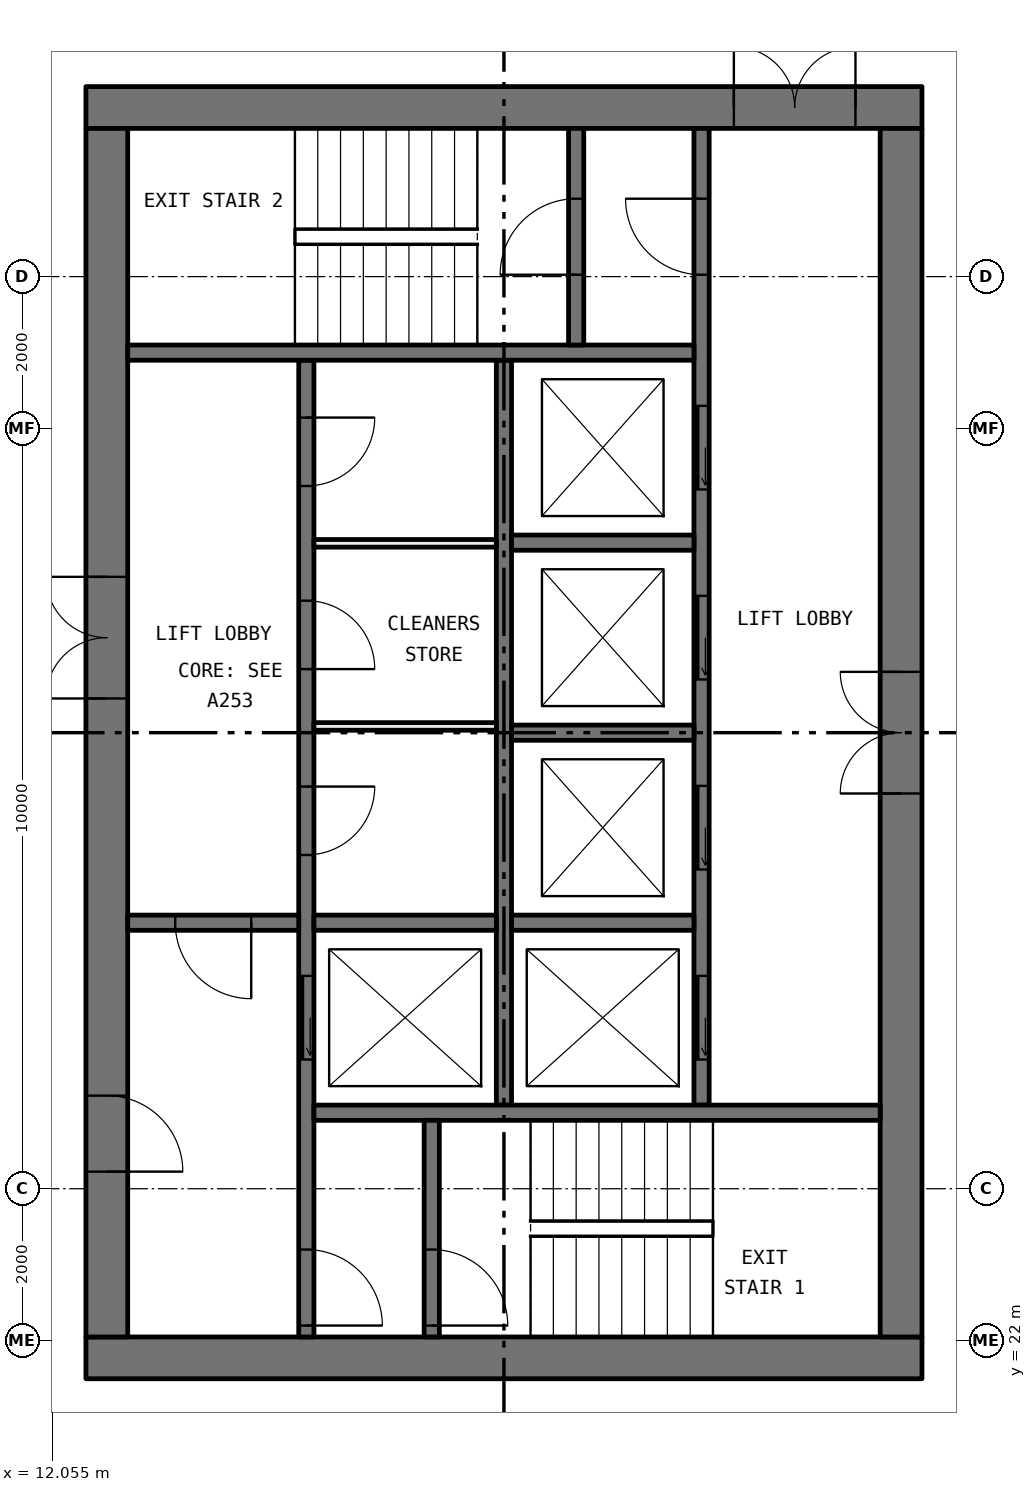
"""IFC4 building model, lengths in metres.
Left out: names, types, materials, properties, quantities, classifications, styles, units other than length and angle.
Written with IfcOpenShell. Run it as: python <this file> out.ifc"""

import sys

from ifc_helpers import new_model, si_unit, direction, frame, frame_2d, origin, place, context, subcontext, project, spatial, rectangle, extrude, element, fill, save


model = new_model("IFC4")
c1 = context("Model", 3, precision=1e-05, world=origin(), true_north=direction((0.0, 1.0)))
c2 = subcontext(c1, "Body", "Model", "MODEL_VIEW")
j1 = project(units=[si_unit("LENGTHUNIT", "METRE"), si_unit("PLANEANGLEUNIT", "RADIAN")], contexts=[c1])
p1 = place(None, origin())
s1 = spatial("IfcSite", under=j1, at=p1, CompositionType="ELEMENT")
p2 = place(p1, origin())
s2 = spatial("IfcBuilding", under=s1, at=p2, CompositionType="ELEMENT")
p3 = place(p2, frame((0.0, 0.0, 196.2)))
s3 = spatial("IfcBuildingStorey", under=s2, at=p3, CompositionType="ELEMENT", Elevation=196.2)
p4 = place(p3, frame((12.5, 21.775, 0.0), z_axis=(0.0, 0.0, 1.0), x_axis=(1.0, 0.0, 0.0)))
e1 = element("IfcWall", 1, at=p4, inside=s3, PredefinedType="SHEAR", context=c2, shape_type="SweptSolid", body=[
    extrude(rectangle(XDim=11.0, YDim=0.55, at=frame_2d((5.5, 0.0))), origin(), (0.0, 0.0, 1.0), 3.05),
])
p5 = place(p3, frame((12.5, 38.225, 0.0), z_axis=(0.0, 0.0, 1.0), x_axis=(1.0, 0.0, 0.0)))
e2 = element("IfcWall", 2, at=p5, inside=s3, PredefinedType="SHEAR", context=c2, shape_type="SweptSolid", body=[
    extrude(rectangle(XDim=11.0, YDim=0.55, at=frame_2d((5.5, 0.0))), origin(), (0.0, 0.0, 1.0), 3.05),
])
p6 = place(p5, frame((8.525, 0.0, 0.0)))
e3 = element("IfcOpeningElement", 3, at=p6, cuts=e2, PredefinedType="OPENING", context=c2, shape_type="SweptSolid", body=[
    extrude(rectangle(XDim=1.6, YDim=2.1, at=frame_2d((0.8, 1.05))), frame((0.0, 0.285, 0.0), z_axis=(0.0, -1.0, 0.0), x_axis=(1.0, 0.0, 0.0)), (0.0, 0.0, 1.0), 0.57),
])
p7 = place(p3, frame((12.775, 22.05, 0.0), z_axis=(0.0, 0.0, 1.0), x_axis=(0.0, 1.0, 0.0)))
e4 = element("IfcWall", 4, at=p7, inside=s3, PredefinedType="SHEAR", context=c2, shape_type="SweptSolid", body=[
    extrude(rectangle(XDim=15.9, YDim=0.55, at=frame_2d((7.95, 0.0))), origin(), (0.0, 0.0, 1.0), 3.05),
])
p8 = place(p7, frame((8.4, 0.0, 0.0)))
e5 = element("IfcOpeningElement", 5, at=p8, cuts=e4, PredefinedType="OPENING", context=c2, shape_type="SweptSolid", body=[
    extrude(rectangle(XDim=1.6, YDim=2.1, at=frame_2d((0.8, 1.05))), frame((0.0, 0.285, 0.0), z_axis=(0.0, -1.0, 0.0), x_axis=(1.0, 0.0, 0.0)), (0.0, 0.0, 1.0), 0.57),
])
p9 = place(p7, frame((2.175, 0.0, 0.0)))
e6 = element("IfcOpeningElement", 6, at=p9, cuts=e4, PredefinedType="OPENING", context=c2, shape_type="SweptSolid", body=[
    extrude(rectangle(XDim=1.0, YDim=2.1, at=frame_2d((0.5, 1.05))), frame((0.0, 0.285, 0.0), z_axis=(0.0, -1.0, 0.0), x_axis=(1.0, 0.0, 0.0)), (0.0, 0.0, 1.0), 0.57),
])
p10 = place(p3, frame((23.225, 22.05, 0.0), z_axis=(0.0, 0.0, 1.0), x_axis=(0.0, 1.0, 0.0)))
e7 = element("IfcWall", 7, at=p10, inside=s3, PredefinedType="SHEAR", context=c2, shape_type="SweptSolid", body=[
    extrude(rectangle(XDim=15.9, YDim=0.55, at=frame_2d((7.95, 0.0))), origin(), (0.0, 0.0, 1.0), 3.05),
])
p11 = place(p10, frame((7.15, 0.0, 0.0)))
e8 = element("IfcOpeningElement", 8, at=p11, cuts=e7, PredefinedType="OPENING", context=c2, shape_type="SweptSolid", body=[
    extrude(rectangle(XDim=1.6, YDim=2.1, at=frame_2d((0.8, 1.05))), frame((0.0, 0.285, 0.0), z_axis=(0.0, -1.0, 0.0), x_axis=(1.0, 0.0, 0.0)), (0.0, 0.0, 1.0), 0.57),
])
p12 = place(p3, frame((15.4, 22.05, 0.0), z_axis=(0.0, 0.0, 1.0), x_axis=(0.0, 1.0, 0.0)))
e9 = element("IfcWall", 9, at=p12, inside=s3, PredefinedType="SOLIDWALL", context=c2, shape_type="SweptSolid", body=[
    extrude(rectangle(XDim=12.85, YDim=0.2, at=frame_2d((6.425, 0.0))), origin(), (0.0, 0.0, 1.0), 3.05),
])
p13 = place(p12, frame((3.65, 0.0, 0.0)))
e10 = element("IfcOpeningElement", 10, at=p13, cuts=e9, PredefinedType="OPENING", context=c2, shape_type="SweptSolid", body=[
    extrude(rectangle(XDim=1.1, YDim=2.1, at=frame_2d((0.55, 1.05))), frame((0.0, 0.11, 0.0), z_axis=(0.0, -1.0, 0.0), x_axis=(1.0, 0.0, 0.0)), (0.0, 0.0, 1.0), 0.22),
])
p14 = place(p12, frame((0.15, 0.0, 0.0)))
e11 = element("IfcOpeningElement", 11, at=p14, cuts=e9, PredefinedType="OPENING", context=c2, shape_type="SweptSolid", body=[
    extrude(rectangle(XDim=1.0, YDim=2.1, at=frame_2d((0.5, 1.05))), frame((0.0, 0.11, 0.0), z_axis=(0.0, -1.0, 0.0), x_axis=(1.0, 0.0, 0.0)), (0.0, 0.0, 1.0), 0.22),
])
p15 = place(p12, frame((6.341, 0.0, 0.0)))
e12 = element("IfcOpeningElement", 12, at=p15, cuts=e9, PredefinedType="OPENING", context=c2, shape_type="SweptSolid", body=[
    extrude(rectangle(XDim=0.9, YDim=2.1, at=frame_2d((0.45, 1.05))), frame((0.0, 0.11, 0.0), z_axis=(0.0, -1.0, 0.0), x_axis=(1.0, 0.0, 0.0)), (0.0, 0.0, 1.0), 0.22),
])
p16 = place(p12, frame((8.787, 0.0, 0.0)))
e13 = element("IfcOpeningElement", 13, at=p16, cuts=e9, PredefinedType="OPENING", context=c2, shape_type="SweptSolid", body=[
    extrude(rectangle(XDim=0.9, YDim=2.1, at=frame_2d((0.45, 1.05))), frame((0.0, 0.11, 0.0), z_axis=(0.0, -1.0, 0.0), x_axis=(1.0, 0.0, 0.0)), (0.0, 0.0, 1.0), 0.22),
])
p17 = place(p12, frame((11.196, 0.0, 0.0)))
e14 = element("IfcOpeningElement", 14, at=p17, cuts=e9, PredefinedType="OPENING", context=c2, shape_type="SweptSolid", body=[
    extrude(rectangle(XDim=0.9, YDim=2.1, at=frame_2d((0.45, 1.05))), frame((0.0, 0.11, 0.0), z_axis=(0.0, -1.0, 0.0), x_axis=(1.0, 0.0, 0.0)), (0.0, 0.0, 1.0), 0.22),
])
p18 = place(p3, frame((20.6, 25.1, 0.0), z_axis=(0.0, 0.0, 1.0), x_axis=(0.0, 1.0, 0.0)))
e15 = element("IfcWall", 15, at=p18, inside=s3, PredefinedType="SOLIDWALL", context=c2, shape_type="SweptSolid", body=[
    extrude(rectangle(XDim=12.85, YDim=0.2, at=frame_2d((6.425, 0.0))), origin(), (0.0, 0.0, 1.0), 3.05),
])
p19 = place(p18, frame((0.6, 0.0, 0.0)))
e16 = element("IfcOpeningElement", 16, at=p19, cuts=e15, PredefinedType="OPENING", context=c2, shape_type="SweptSolid", body=[
    extrude(rectangle(XDim=1.1, YDim=2.1, at=frame_2d((0.55, 1.05))), frame((0.0, 0.11, 0.0), z_axis=(0.0, -1.0, 0.0), x_axis=(1.0, 0.0, 0.0)), (0.0, 0.0, 1.0), 0.22),
])
p20 = place(p18, frame((3.1, 0.0, 0.0)))
e17 = element("IfcOpeningElement", 17, at=p20, cuts=e15, PredefinedType="OPENING", context=c2, shape_type="SweptSolid", body=[
    extrude(rectangle(XDim=1.1, YDim=2.1, at=frame_2d((0.55, 1.05))), frame((0.0, 0.11, 0.0), z_axis=(0.0, -1.0, 0.0), x_axis=(1.0, 0.0, 0.0)), (0.0, 0.0, 1.0), 0.22),
])
p21 = place(p18, frame((5.6, 0.0, 0.0)))
e18 = element("IfcOpeningElement", 18, at=p21, cuts=e15, PredefinedType="OPENING", context=c2, shape_type="SweptSolid", body=[
    extrude(rectangle(XDim=1.1, YDim=2.1, at=frame_2d((0.55, 1.05))), frame((0.0, 0.11, 0.0), z_axis=(0.0, -1.0, 0.0), x_axis=(1.0, 0.0, 0.0)), (0.0, 0.0, 1.0), 0.22),
])
p22 = place(p18, frame((8.1, 0.0, 0.0)))
e19 = element("IfcOpeningElement", 19, at=p22, cuts=e15, PredefinedType="OPENING", context=c2, shape_type="SweptSolid", body=[
    extrude(rectangle(XDim=1.1, YDim=2.1, at=frame_2d((0.55, 1.05))), frame((0.0, 0.11, 0.0), z_axis=(0.0, -1.0, 0.0), x_axis=(1.0, 0.0, 0.0)), (0.0, 0.0, 1.0), 0.22),
])
p23 = place(p18, frame((10.925, 0.0, 0.0)))
e20 = element("IfcOpeningElement", 20, at=p23, cuts=e15, PredefinedType="OPENING", context=c2, shape_type="SweptSolid", body=[
    extrude(rectangle(XDim=1.0, YDim=2.1, at=frame_2d((0.5, 1.05))), frame((0.0, 0.11, 0.0), z_axis=(0.0, -1.0, 0.0), x_axis=(1.0, 0.0, 0.0)), (0.0, 0.0, 1.0), 0.22),
])
p24 = place(p3, frame((18.0, 25.1, 0.0), z_axis=(0.0, 0.0, 1.0), x_axis=(0.0, 1.0, 0.0)))
e21 = element("IfcWall", 21, at=p24, inside=s3, PredefinedType="SOLIDWALL", context=c2, shape_type="SweptSolid", body=[
    extrude(rectangle(XDim=9.8, YDim=0.2, at=frame_2d((4.9, 0.0))), origin(), (0.0, 0.0, 1.0), 3.05),
])
for number, where, z_axis, x_axis in (
    (22, (15.5, 25.0, 0.0), (0.0, 0.0, 1.0), (1.0, 0.0, 0.0)),
    (23, (13.05, 35.0, 0.0), (0.0, 0.0, 1.0), (1.0, 0.0, 0.0)),
):
    element("IfcWall", number, at=place(p3, frame(where, z_axis=z_axis, x_axis=x_axis)), inside=s3, PredefinedType="SOLIDWALL", context=c2, shape_type="SweptSolid", body=[
        extrude(rectangle(XDim=7.45, YDim=0.2, at=frame_2d((3.725, 0.0))), origin(), (0.0, 0.0, 1.0), 3.05),
    ])
p25 = place(p3, frame((13.05, 27.5, 0.0), z_axis=(0.0, 0.0, 1.0), x_axis=(1.0, 0.0, 0.0)))
e24 = element("IfcWall", 24, at=p25, inside=s3, PredefinedType="SOLIDWALL", context=c2, shape_type="SweptSolid", body=[
    extrude(rectangle(XDim=2.25, YDim=0.2, at=frame_2d((1.125, 0.0))), origin(), (0.0, 0.0, 1.0), 3.05),
])
p26 = place(p25, frame((0.625, 0.0, 0.0)))
e25 = element("IfcOpeningElement", 25, at=p26, cuts=e24, PredefinedType="OPENING", context=c2, shape_type="SweptSolid", body=[
    extrude(rectangle(XDim=1.0, YDim=2.1, at=frame_2d((0.5, 1.05))), frame((0.0, 0.11, 0.0), z_axis=(0.0, -1.0, 0.0), x_axis=(1.0, 0.0, 0.0)), (0.0, 0.0, 1.0), 0.22),
])
p27 = place(p3, frame((17.05, 22.05, 0.0), z_axis=(0.0, 0.0, 1.0), x_axis=(0.0, 1.0, 0.0)))
e26 = element("IfcWall", 26, at=p27, inside=s3, PredefinedType="SOLIDWALL", context=c2, shape_type="SweptSolid", body=[
    extrude(rectangle(XDim=2.85, YDim=0.2, at=frame_2d((1.425, 0.0))), origin(), (0.0, 0.0, 1.0), 3.05),
])
p28 = place(p27, frame((0.15, 0.0, 0.0)))
e27 = element("IfcOpeningElement", 27, at=p28, cuts=e26, PredefinedType="OPENING", context=c2, shape_type="SweptSolid", body=[
    extrude(rectangle(XDim=1.0, YDim=2.1, at=frame_2d((0.5, 1.05))), frame((0.0, 0.11, 0.0), z_axis=(0.0, -1.0, 0.0), x_axis=(1.0, 0.0, 0.0)), (0.0, 0.0, 1.0), 0.22),
])
p29 = place(p3, frame((18.95, 35.1, 0.0), z_axis=(0.0, 0.0, 1.0), x_axis=(0.0, 1.0, 0.0)))
e28 = element("IfcWall", 28, at=p29, inside=s3, PredefinedType="SOLIDWALL", context=c2, shape_type="SweptSolid", body=[
    extrude(rectangle(XDim=2.85, YDim=0.2, at=frame_2d((1.425, 0.0))), origin(), (0.0, 0.0, 1.0), 3.05),
])
p30 = place(p29, frame((0.925, 0.0, 0.0)))
e29 = element("IfcOpeningElement", 29, at=p30, cuts=e28, PredefinedType="OPENING", context=c2, shape_type="SweptSolid", body=[
    extrude(rectangle(XDim=1.0, YDim=2.1, at=frame_2d((0.5, 1.05))), frame((0.0, 0.11, 0.0), z_axis=(0.0, -1.0, 0.0), x_axis=(1.0, 0.0, 0.0)), (0.0, 0.0, 1.0), 0.22),
])
for number, where, z_axis, x_axis in (
    (30, (15.5, 27.5, 0.0), (0.0, 0.0, 1.0), (1.0, 0.0, 0.0)),
    (31, (18.1, 27.5, 0.0), (0.0, 0.0, 1.0), (1.0, 0.0, 0.0)),
    (32, (18.1, 30.0, 0.0), (0.0, 0.0, 1.0), (1.0, 0.0, 0.0)),
    (33, (18.1, 32.5, 0.0), (0.0, 0.0, 1.0), (1.0, 0.0, 0.0)),
):
    element("IfcWall", number, at=place(p3, frame(where, z_axis=z_axis, x_axis=x_axis)), inside=s3, PredefinedType="SOLIDWALL", context=c2, shape_type="SweptSolid", body=[
        extrude(rectangle(XDim=2.4, YDim=0.2, at=frame_2d((1.2, 0.0))), origin(), (0.0, 0.0, 1.0), 3.05),
    ])
for number, where, z_axis, x_axis in (
    (34, (15.5, 30.082, 0.0), (0.0, 0.0, 1.0), (1.0, 0.0, 0.0)),
    (35, (15.5, 32.491, 0.0), (0.0, 0.0, 1.0), (1.0, 0.0, 0.0)),
):
    element("IfcWall", number, at=place(p3, frame(where, z_axis=z_axis, x_axis=x_axis)), inside=s3, PredefinedType="PARTITIONING", context=c2, shape_type="SweptSolid", body=[
        extrude(rectangle(XDim=2.4, YDim=0.1, at=frame_2d((1.2, 0.0))), origin(), (0.0, 0.0, 1.0), 3.05),
    ])
p31 = place(p19, origin())
e36 = element("IfcDoor", 36, at=p31, inside=s3, OperationType="SLIDING_TO_LEFT", PredefinedType="DOOR", context=c2, shape_type="SweptSolid", body=[
    extrude(rectangle(XDim=1.1, YDim=2.1, at=frame_2d((0.55, 1.05))), frame((0.0, 0.025, 0.0), z_axis=(0.0, -1.0, 0.0), x_axis=(1.0, 0.0, 0.0)), (0.0, 0.0, 1.0), 0.05),
])
fill(e16, e36)
p32 = place(p20, origin())
e37 = element("IfcDoor", 37, at=p32, inside=s3, OperationType="SLIDING_TO_LEFT", PredefinedType="DOOR", context=c2, shape_type="SweptSolid", body=[
    extrude(rectangle(XDim=1.1, YDim=2.1, at=frame_2d((0.55, 1.05))), frame((0.0, 0.025, 0.0), z_axis=(0.0, -1.0, 0.0), x_axis=(1.0, 0.0, 0.0)), (0.0, 0.0, 1.0), 0.05),
])
fill(e17, e37)
p33 = place(p21, origin())
e38 = element("IfcDoor", 38, at=p33, inside=s3, OperationType="SLIDING_TO_LEFT", PredefinedType="DOOR", context=c2, shape_type="SweptSolid", body=[
    extrude(rectangle(XDim=1.1, YDim=2.1, at=frame_2d((0.55, 1.05))), frame((0.0, 0.025, 0.0), z_axis=(0.0, -1.0, 0.0), x_axis=(1.0, 0.0, 0.0)), (0.0, 0.0, 1.0), 0.05),
])
fill(e18, e38)
p34 = place(p22, origin())
e39 = element("IfcDoor", 39, at=p34, inside=s3, OperationType="SLIDING_TO_LEFT", PredefinedType="DOOR", context=c2, shape_type="SweptSolid", body=[
    extrude(rectangle(XDim=1.1, YDim=2.1, at=frame_2d((0.55, 1.05))), frame((0.0, 0.025, 0.0), z_axis=(0.0, -1.0, 0.0), x_axis=(1.0, 0.0, 0.0)), (0.0, 0.0, 1.0), 0.05),
])
fill(e19, e39)
p35 = place(p13, origin())
e40 = element("IfcDoor", 40, at=p35, inside=s3, OperationType="SLIDING_TO_LEFT", PredefinedType="DOOR", context=c2, shape_type="SweptSolid", body=[
    extrude(rectangle(XDim=1.1, YDim=2.1, at=frame_2d((0.55, 1.05))), frame((0.0, 0.025, 0.0), z_axis=(0.0, -1.0, 0.0), x_axis=(1.0, 0.0, 0.0)), (0.0, 0.0, 1.0), 0.05),
])
fill(e10, e40)
p36 = place(p28, frame((1.0, 0.0, 0.0), x_axis=(-1.0, 0.0, 0.0)))
e41 = element("IfcDoor", 41, at=p36, inside=s3, OperationType="SINGLE_SWING_LEFT", PredefinedType="DOOR", context=c2, shape_type="SweptSolid", body=[
    extrude(rectangle(XDim=1.0, YDim=2.1, at=frame_2d((0.5, 1.05))), frame((0.0, 0.025, 0.0), z_axis=(0.0, -1.0, 0.0), x_axis=(1.0, 0.0, 0.0)), (0.0, 0.0, 1.0), 0.05),
])
fill(e27, e41)
p37 = place(p14, frame((1.0, 0.0, 0.0), x_axis=(-1.0, 0.0, 0.0)))
e42 = element("IfcDoor", 42, at=p37, inside=s3, OperationType="SINGLE_SWING_LEFT", PredefinedType="DOOR", context=c2, shape_type="SweptSolid", body=[
    extrude(rectangle(XDim=1.0, YDim=2.1, at=frame_2d((0.5, 1.05))), frame((0.0, 0.025, 0.0), z_axis=(0.0, -1.0, 0.0), x_axis=(1.0, 0.0, 0.0)), (0.0, 0.0, 1.0), 0.05),
])
fill(e11, e42)
p38 = place(p23, origin())
e43 = element("IfcDoor", 43, at=p38, inside=s3, OperationType="SINGLE_SWING_LEFT", PredefinedType="DOOR", context=c2, shape_type="SweptSolid", body=[
    extrude(rectangle(XDim=1.0, YDim=2.1, at=frame_2d((0.5, 1.05))), frame((0.0, 0.025, 0.0), z_axis=(0.0, -1.0, 0.0), x_axis=(1.0, 0.0, 0.0)), (0.0, 0.0, 1.0), 0.05),
])
fill(e20, e43)
p39 = place(p30, origin())
e44 = element("IfcDoor", 44, at=p39, inside=s3, OperationType="SINGLE_SWING_RIGHT", PredefinedType="DOOR", context=c2, shape_type="SweptSolid", body=[
    extrude(rectangle(XDim=1.0, YDim=2.1, at=frame_2d((0.5, 1.05))), frame((0.0, 0.025, 0.0), z_axis=(0.0, -1.0, 0.0), x_axis=(1.0, 0.0, 0.0)), (0.0, 0.0, 1.0), 0.05),
])
fill(e29, e44)
p40 = place(p26, frame((1.0, 0.0, 0.0), x_axis=(-1.0, 0.0, 0.0)))
e45 = element("IfcDoor", 45, at=p40, inside=s3, OperationType="SINGLE_SWING_RIGHT", PredefinedType="DOOR", context=c2, shape_type="SweptSolid", body=[
    extrude(rectangle(XDim=1.0, YDim=2.1, at=frame_2d((0.5, 1.05))), frame((0.0, 0.025, 0.0), z_axis=(0.0, -1.0, 0.0), x_axis=(1.0, 0.0, 0.0)), (0.0, 0.0, 1.0), 0.05),
])
fill(e25, e45)
p41 = place(p8, origin())
e46 = element("IfcDoor", 46, at=p41, inside=s3, OperationType="DOUBLE_DOOR_SINGLE_SWING", PredefinedType="DOOR", context=c2, shape_type="SweptSolid", body=[
    extrude(rectangle(XDim=1.6, YDim=2.1, at=frame_2d((0.8, 1.05))), frame((0.0, 0.025, 0.0), z_axis=(0.0, -1.0, 0.0), x_axis=(1.0, 0.0, 0.0)), (0.0, 0.0, 1.0), 0.05),
])
fill(e5, e46)
p42 = place(p9, frame((1.0, 0.0, 0.0), x_axis=(-1.0, 0.0, 0.0)))
e47 = element("IfcDoor", 47, at=p42, inside=s3, OperationType="SINGLE_SWING_LEFT", PredefinedType="DOOR", context=c2, shape_type="SweptSolid", body=[
    extrude(rectangle(XDim=1.0, YDim=2.1, at=frame_2d((0.5, 1.05))), frame((0.0, 0.025, 0.0), z_axis=(0.0, -1.0, 0.0), x_axis=(1.0, 0.0, 0.0)), (0.0, 0.0, 1.0), 0.05),
])
fill(e6, e47)
p43 = place(p6, origin())
e48 = element("IfcDoor", 48, at=p43, inside=s3, OperationType="DOUBLE_DOOR_SINGLE_SWING", PredefinedType="DOOR", context=c2, shape_type="SweptSolid", body=[
    extrude(rectangle(XDim=1.6, YDim=2.1, at=frame_2d((0.8, 1.05))), frame((0.0, 0.025, 0.0), z_axis=(0.0, -1.0, 0.0), x_axis=(1.0, 0.0, 0.0)), (0.0, 0.0, 1.0), 0.05),
])
fill(e3, e48)
p44 = place(p11, origin())
e49 = element("IfcDoor", 49, at=p44, inside=s3, OperationType="DOUBLE_DOOR_SINGLE_SWING", PredefinedType="DOOR", context=c2, shape_type="SweptSolid", body=[
    extrude(rectangle(XDim=1.6, YDim=2.1, at=frame_2d((0.8, 1.05))), frame((0.0, 0.025, 0.0), z_axis=(0.0, -1.0, 0.0), x_axis=(1.0, 0.0, 0.0)), (0.0, 0.0, 1.0), 0.05),
])
fill(e8, e49)
p45 = place(p15, frame((0.9, 0.0, 0.0), x_axis=(-1.0, 0.0, 0.0)))
e50 = element("IfcDoor", 50, at=p45, inside=s3, OperationType="SINGLE_SWING_RIGHT", PredefinedType="DOOR", context=c2, shape_type="SweptSolid", body=[
    extrude(rectangle(XDim=0.9, YDim=2.1, at=frame_2d((0.45, 1.05))), frame((0.0, 0.025, 0.0), z_axis=(0.0, -1.0, 0.0), x_axis=(1.0, 0.0, 0.0)), (0.0, 0.0, 1.0), 0.05),
])
fill(e12, e50)
p46 = place(p16, frame((0.9, 0.0, 0.0), x_axis=(-1.0, 0.0, 0.0)))
e51 = element("IfcDoor", 51, at=p46, inside=s3, OperationType="SINGLE_SWING_LEFT", PredefinedType="DOOR", context=c2, shape_type="SweptSolid", body=[
    extrude(rectangle(XDim=0.9, YDim=2.1, at=frame_2d((0.45, 1.05))), frame((0.0, 0.025, 0.0), z_axis=(0.0, -1.0, 0.0), x_axis=(1.0, 0.0, 0.0)), (0.0, 0.0, 1.0), 0.05),
])
fill(e13, e51)
p47 = place(p17, frame((0.9, 0.0, 0.0), x_axis=(-1.0, 0.0, 0.0)))
e52 = element("IfcDoor", 52, at=p47, inside=s3, OperationType="SINGLE_SWING_RIGHT", PredefinedType="DOOR", context=c2, shape_type="SweptSolid", body=[
    extrude(rectangle(XDim=0.9, YDim=2.1, at=frame_2d((0.45, 1.05))), frame((0.0, 0.025, 0.0), z_axis=(0.0, -1.0, 0.0), x_axis=(1.0, 0.0, 0.0)), (0.0, 0.0, 1.0), 0.05),
])
fill(e14, e52)
save(model, sys.argv[1])
